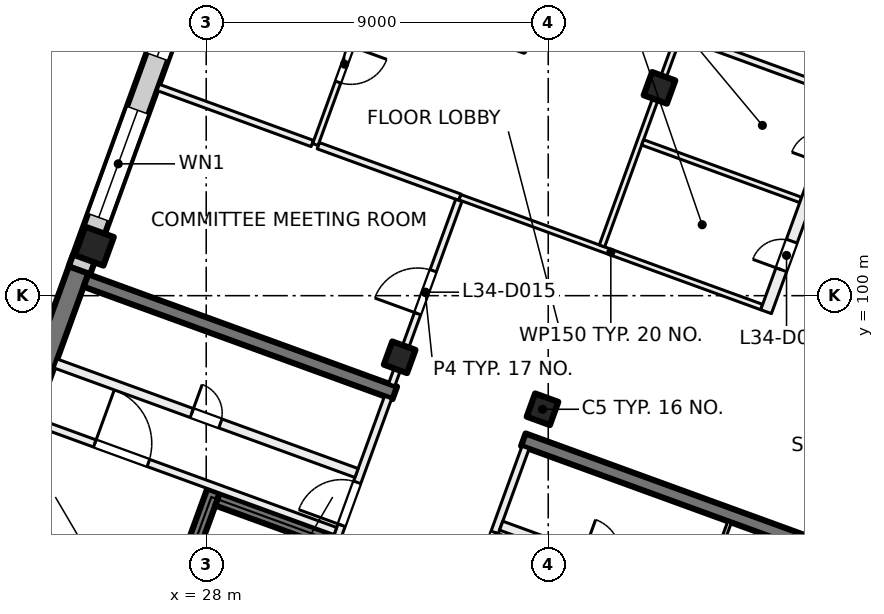
"""IFC4 building model, lengths in metres.
Left out: names, types, materials, properties, quantities, classifications, styles, units other than length and angle.
Written with IfcOpenShell. Run it as: python <this file> out.ifc"""

import sys

from ifc_helpers import new_model, si_unit, direction, frame, frame_2d, origin, origin_2d, place, context, subcontext, project, spatial, rectangle, extrude, element, fill, save


model = new_model("IFC4")
c1 = context("Model", 3, precision=1e-05, world=origin(), true_north=direction((0.0, 1.0)))
c2 = subcontext(c1, "Body", "Model", "MODEL_VIEW")
j1 = project(units=[si_unit("LENGTHUNIT", "METRE"), si_unit("PLANEANGLEUNIT", "RADIAN")], contexts=[c1])
p1 = place(None, origin())
s1 = spatial("IfcSite", under=j1, at=p1, CompositionType="ELEMENT")
p2 = place(p1, origin())
s2 = spatial("IfcBuilding", under=s1, at=p2, CompositionType="ELEMENT")
p3 = place(p2, frame((0.0, 0.0, 146.5)))
s3 = spatial("IfcBuildingStorey", under=s2, at=p3, CompositionType="ELEMENT", Elevation=146.5)
for number, where, z_axis, x_axis in (
    (1, (39.927, 105.468, 0.0), (0.0, 0.0, 1.0), (-0.342, -0.94, 0.0)),
    (2, (36.849, 97.011, 0.0), (0.0, 0.0, 1.0), (-0.342, -0.94, 0.0)),
    (3, (33.091, 98.379, 0.0), (0.0, 0.0, 1.0), (-0.342, -0.94, 0.0)),
):
    element("IfcColumn", number, at=place(p3, frame(where, z_axis=z_axis, x_axis=x_axis)), inside=s3, PredefinedType="COLUMN", context=c2, shape_type="SweptSolid", body=[
        extrude(rectangle(XDim=0.65, YDim=0.65, at=origin_2d()), origin(), (0.0, 0.0, 1.0), 4.0),
    ])
p4 = place(p3, frame((25.056, 101.303, 0.0), z_axis=(0.0, 0.0, 1.0), x_axis=(-0.342020143326, -0.939692620786, 0.0)))
e4 = element("IfcColumn", 4, at=p4, inside=s3, PredefinedType="COLUMN", context=c2, shape_type="SweptSolid", body=[
    extrude(rectangle(XDim=0.8, YDim=0.8, at=origin_2d()), origin(), (0.0, 0.0, 1.0), 4.0),
])
p5 = place(p3, frame((41.85, 85.241, 0.0), z_axis=(0.0, 0.0, 1.0), x_axis=(0.34201902012, 0.939693029598, 0.0)))
e5 = element("IfcWall", 5, at=p5, inside=s3, PredefinedType="SHEAR", context=c2, shape_type="SweptSolid", body=[
    extrude(rectangle(XDim=8.95, YDim=0.55, at=frame_2d((4.475, 0.0))), origin(), (0.0, 0.0, 1.0), 4.0),
])
p6 = place(p3, frame((21.694, 92.577, 0.0), z_axis=(0.0, 0.0, 1.0), x_axis=(0.342010253184, 0.939696220444, 0.0)))
e6 = element("IfcWall", 6, at=p6, inside=s3, PredefinedType="SHEAR", context=c2, shape_type="SweptSolid", body=[
    extrude(rectangle(XDim=8.95, YDim=0.55, at=frame_2d((4.475, 0.0))), origin(), (0.0, 0.0, 1.0), 4.0),
])
p7 = place(p3, frame((27.208, 82.216, 0.0), z_axis=(0.0, 0.0, 1.0), x_axis=(0.34201563943, 0.939694260058, 0.0)))
e7 = element("IfcWall", 7, at=p7, inside=s3, PredefinedType="SHEAR", context=c2, shape_type="SweptSolid", body=[
    extrude(rectangle(XDim=12.225, YDim=0.35, at=frame_2d((6.113, 0.0))), origin(), (0.0, 0.0, 1.0), 4.0),
])
p8 = place(p7, frame((0.7, 0.0, 0.0)))
e8 = element("IfcOpeningElement", 8, at=p8, cuts=e7, PredefinedType="OPENING", context=c2, shape_type="SweptSolid", body=[
    extrude(rectangle(XDim=1.1, YDim=2.1, at=frame_2d((0.55, 1.05))), frame((0.0, 0.185, 0.0), z_axis=(0.0, -1.0, 0.0), x_axis=(1.0, 0.0, 0.0)), (0.0, 0.0, 1.0), 0.37),
])
p9 = place(p7, frame((3.1, 0.0, 0.0)))
e9 = element("IfcOpeningElement", 9, at=p9, cuts=e7, PredefinedType="OPENING", context=c2, shape_type="SweptSolid", body=[
    extrude(rectangle(XDim=1.1, YDim=2.1, at=frame_2d((0.55, 1.05))), frame((0.0, 0.185, 0.0), z_axis=(0.0, -1.0, 0.0), x_axis=(1.0, 0.0, 0.0)), (0.0, 0.0, 1.0), 0.37),
])
p10 = place(p7, frame((5.5, 0.0, 0.0)))
e10 = element("IfcOpeningElement", 10, at=p10, cuts=e7, PredefinedType="OPENING", context=c2, shape_type="SweptSolid", body=[
    extrude(rectangle(XDim=1.1, YDim=2.1, at=frame_2d((0.55, 1.05))), frame((0.0, 0.185, 0.0), z_axis=(0.0, -1.0, 0.0), x_axis=(1.0, 0.0, 0.0)), (0.0, 0.0, 1.0), 0.37),
])
p11 = place(p7, frame((10.3, 0.0, 0.0)))
e11 = element("IfcOpeningElement", 11, at=p11, cuts=e7, PredefinedType="OPENING", context=c2, shape_type="SweptSolid", body=[
    extrude(rectangle(XDim=1.1, YDim=2.1, at=frame_2d((0.55, 1.05))), frame((0.0, 0.185, 0.0), z_axis=(0.0, -1.0, 0.0), x_axis=(1.0, 0.0, 0.0)), (0.0, 0.0, 1.0), 0.37),
])
p12 = place(p3, frame((24.013, 83.379, 0.0), z_axis=(0.0, 0.0, 1.0), x_axis=(0.34201563943, 0.939694260058, 0.0)))
e12 = element("IfcWall", 12, at=p12, inside=s3, PredefinedType="SHEAR", context=c2, shape_type="SweptSolid", body=[
    extrude(rectangle(XDim=12.225, YDim=0.35, at=frame_2d((6.113, 0.0))), origin(), (0.0, 0.0, 1.0), 4.0),
])
p13 = place(p12, frame((7.95, 0.0, 0.0)))
e13 = element("IfcOpeningElement", 13, at=p13, cuts=e12, PredefinedType="OPENING", context=c2, shape_type="SweptSolid", body=[
    extrude(rectangle(XDim=1.1, YDim=2.1, at=frame_2d((0.55, 1.05))), frame((0.0, 0.185, 0.0), z_axis=(0.0, -1.0, 0.0), x_axis=(1.0, 0.0, 0.0)), (0.0, 0.0, 1.0), 0.37),
])
p14 = place(p3, frame((31.165, 93.599, 0.0), z_axis=(0.0, 0.0, 1.0), x_axis=(-0.939683528043, 0.3420451244, 0.0)))
e14 = element("IfcWall", 14, at=p14, inside=s3, PredefinedType="SHEAR", context=c2, shape_type="SweptSolid", body=[
    extrude(rectangle(XDim=3.05, YDim=0.35, at=frame_2d((1.525, 0.0))), origin(), (0.0, 0.0, 1.0), 4.0),
])
p15 = place(p3, frame((44.473, 93.251, 0.0), z_axis=(0.0, 0.0, 1.0), x_axis=(-0.939692847377, 0.34201952077, 0.0)))
e15 = element("IfcWall", 15, at=p15, inside=s3, PredefinedType="SHEAR", context=c2, shape_type="SweptSolid", body=[
    extrude(rectangle(XDim=8.65, YDim=0.35, at=frame_2d((4.325, 0.0))), origin(), (0.0, 0.0, 1.0), 4.0),
])
p16 = place(p3, frame((32.962, 97.441, 0.0), z_axis=(0.0, 0.0, 1.0), x_axis=(-0.939689545667, 0.342028592028, 0.0)))
e16 = element("IfcWall", 16, at=p16, inside=s3, PredefinedType="SHEAR", context=c2, shape_type="SweptSolid", body=[
    extrude(rectangle(XDim=8.65, YDim=0.35, at=frame_2d((4.325, 0.0))), origin(), (0.0, 0.0, 1.0), 4.0),
])
p17 = place(p3, frame((24.666, 100.669, 0.0), z_axis=(0.0, 0.0, 1.0), x_axis=(0.34201964167, 0.939692803373, 0.0)))
e17 = element("IfcWall", 17, at=p17, inside=s3, PredefinedType="SOLIDWALL", context=c2, shape_type="SweptSolid", body=[
    extrude(rectangle(XDim=32.884, YDim=0.6, at=frame_2d((16.442, 0.0))), origin(), (0.0, 0.0, 1.0), 3.625),
])
p18 = place(p17, frame((1.48, 0.0, 0.9)))
e18 = element("IfcOpeningElement", 18, at=p18, cuts=e17, PredefinedType="OPENING", context=c2, shape_type="SweptSolid", body=[
    extrude(rectangle(XDim=3.0, YDim=2.4, at=frame_2d((1.5, 1.2))), frame((0.0, 0.31, 0.0), z_axis=(0.0, -1.0, 0.0), x_axis=(1.0, 0.0, 0.0)), (0.0, 0.0, 1.0), 0.62),
])
p19 = place(p17, frame((5.98, 0.0, 0.9)))
e19 = element("IfcOpeningElement", 19, at=p19, cuts=e17, PredefinedType="OPENING", context=c2, shape_type="SweptSolid", body=[
    extrude(rectangle(XDim=3.0, YDim=2.4, at=frame_2d((1.5, 1.2))), frame((0.0, 0.31, 0.0), z_axis=(0.0, -1.0, 0.0), x_axis=(1.0, 0.0, 0.0)), (0.0, 0.0, 1.0), 0.62),
])
p20 = place(p17, frame((10.48, 0.0, 0.9)))
e20 = element("IfcOpeningElement", 20, at=p20, cuts=e17, PredefinedType="OPENING", context=c2, shape_type="SweptSolid", body=[
    extrude(rectangle(XDim=3.0, YDim=2.4, at=frame_2d((1.5, 1.2))), frame((0.0, 0.31, 0.0), z_axis=(0.0, -1.0, 0.0), x_axis=(1.0, 0.0, 0.0)), (0.0, 0.0, 1.0), 0.62),
])
p21 = place(p17, frame((14.98, 0.0, 0.9)))
e21 = element("IfcOpeningElement", 21, at=p21, cuts=e17, PredefinedType="OPENING", context=c2, shape_type="SweptSolid", body=[
    extrude(rectangle(XDim=3.0, YDim=2.4, at=frame_2d((1.5, 1.2))), frame((0.0, 0.31, 0.0), z_axis=(0.0, -1.0, 0.0), x_axis=(1.0, 0.0, 0.0)), (0.0, 0.0, 1.0), 0.62),
])
p22 = place(p17, frame((19.48, 0.0, 0.9)))
e22 = element("IfcOpeningElement", 22, at=p22, cuts=e17, PredefinedType="OPENING", context=c2, shape_type="SweptSolid", body=[
    extrude(rectangle(XDim=3.0, YDim=2.4, at=frame_2d((1.5, 1.2))), frame((0.0, 0.31, 0.0), z_axis=(0.0, -1.0, 0.0), x_axis=(1.0, 0.0, 0.0)), (0.0, 0.0, 1.0), 0.62),
])
p23 = place(p17, frame((23.98, 0.0, 0.9)))
e23 = element("IfcOpeningElement", 23, at=p23, cuts=e17, PredefinedType="OPENING", context=c2, shape_type="SweptSolid", body=[
    extrude(rectangle(XDim=3.0, YDim=2.4, at=frame_2d((1.5, 1.2))), frame((0.0, 0.31, 0.0), z_axis=(0.0, -1.0, 0.0), x_axis=(1.0, 0.0, 0.0)), (0.0, 0.0, 1.0), 0.62),
])
p24 = place(p17, frame((28.48, 0.0, 0.9)))
e24 = element("IfcOpeningElement", 24, at=p24, cuts=e17, PredefinedType="OPENING", context=c2, shape_type="SweptSolid", body=[
    extrude(rectangle(XDim=3.0, YDim=2.4, at=frame_2d((1.5, 1.2))), frame((0.0, 0.31, 0.0), z_axis=(0.0, -1.0, 0.0), x_axis=(1.0, 0.0, 0.0)), (0.0, 0.0, 1.0), 0.62),
])
p25 = place(p3, frame((31.459, 93.678, 0.0), z_axis=(0.0, 0.0, 1.0), x_axis=(0.341985870128, 0.939705094502, 0.0)))
e25 = element("IfcWall", 25, at=p25, inside=s3, PredefinedType="PARTITIONING", context=c2, shape_type="SweptSolid", body=[
    extrude(rectangle(XDim=3.875, YDim=0.2, at=frame_2d((1.938, 0.0))), origin(), (0.0, 0.0, 1.0), 3.625),
])
p26 = place(p25, frame((0.3, 0.0, 0.0)))
e26 = element("IfcOpeningElement", 26, at=p26, cuts=e25, PredefinedType="OPENING", context=c2, shape_type="SweptSolid", body=[
    extrude(rectangle(XDim=1.2, YDim=2.1, at=frame_2d((0.6, 1.05))), frame((0.0, 0.11, 0.0), z_axis=(0.0, -1.0, 0.0), x_axis=(1.0, 0.0, 0.0)), (0.0, 0.0, 1.0), 0.22),
])
p27 = place(p3, frame((23.483, 96.688, 0.0), z_axis=(0.0, 0.0, 1.0), x_axis=(0.939691007314, -0.342024576271, 0.0)))
e27 = element("IfcWall", 27, at=p27, inside=s3, PredefinedType="PARTITIONING", context=c2, shape_type="SweptSolid", body=[
    extrude(rectangle(XDim=8.425, YDim=0.2, at=frame_2d((4.212, 0.0))), origin(), (0.0, 0.0, 1.0), 3.625),
])
p28 = place(p27, frame((1.688, 0.0, 0.0)))
e28 = element("IfcOpeningElement", 28, at=p28, cuts=e27, PredefinedType="OPENING", context=c2, shape_type="SweptSolid", body=[
    extrude(rectangle(XDim=1.5, YDim=2.1, at=frame_2d((0.75, 1.05))), frame((0.0, 0.11, 0.0), z_axis=(0.0, -1.0, 0.0), x_axis=(1.0, 0.0, 0.0)), (0.0, 0.0, 1.0), 0.22),
])
p29 = place(p3, frame((24.039, 98.215, 0.0), z_axis=(0.0, 0.0, 1.0), x_axis=(0.939687617333, -0.342033889887, 0.0)))
e29 = element("IfcWall", 29, at=p29, inside=s3, PredefinedType="PARTITIONING", context=c2, shape_type="SweptSolid", body=[
    extrude(rectangle(XDim=8.425, YDim=0.25, at=frame_2d((4.212, 0.0))), origin(), (0.0, 0.0, 1.0), 3.625),
])
p30 = place(p29, frame((3.812, 0.0, 0.0)))
e30 = element("IfcOpeningElement", 30, at=p30, cuts=e29, PredefinedType="OPENING", context=c2, shape_type="SweptSolid", body=[
    extrude(rectangle(XDim=0.8, YDim=2.1, at=frame_2d((0.4, 1.05))), frame((0.0, 0.135, 0.0), z_axis=(0.0, -1.0, 0.0), x_axis=(1.0, 0.0, 0.0)), (0.0, 0.0, 1.0), 0.27),
])
p31 = place(p3, frame((36.403, 96.003, 0.0), z_axis=(0.0, 0.0, 1.0), x_axis=(-0.342041503764, -0.939684845947, 0.0)))
e31 = element("IfcWall", 31, at=p31, inside=s3, PredefinedType="PARTITIONING", context=c2, shape_type="SweptSolid", body=[
    extrude(rectangle(XDim=3.875, YDim=0.2, at=frame_2d((1.938, 0.0))), origin(), (0.0, 0.0, 1.0), 3.625),
])
p32 = place(p31, frame((2.375, 0.0, 0.0)))
e32 = element("IfcOpeningElement", 32, at=p32, cuts=e31, PredefinedType="OPENING", context=c2, shape_type="SweptSolid", body=[
    extrude(rectangle(XDim=1.2, YDim=2.1, at=frame_2d((0.6, 1.05))), frame((0.0, 0.11, 0.0), z_axis=(0.0, -1.0, 0.0), x_axis=(1.0, 0.0, 0.0)), (0.0, 0.0, 1.0), 0.22),
])
p33 = place(p3, frame((35.761, 93.948, 0.0), z_axis=(0.0, 0.0, 1.0), x_axis=(0.93969693093, -0.342008301071, 0.0)))
e33 = element("IfcWall", 33, at=p33, inside=s3, PredefinedType="PARTITIONING", context=c2, shape_type="SweptSolid", body=[
    extrude(rectangle(XDim=8.425, YDim=0.25, at=frame_2d((4.212, 0.0))), origin(), (0.0, 0.0, 1.0), 3.625),
])
p34 = place(p33, frame((2.282, 0.0, 0.0)))
e34 = element("IfcOpeningElement", 34, at=p34, cuts=e33, PredefinedType="OPENING", context=c2, shape_type="SweptSolid", body=[
    extrude(rectangle(XDim=1.0, YDim=2.1, at=frame_2d((0.5, 1.05))), frame((0.0, 0.135, 0.0), z_axis=(0.0, -1.0, 0.0), x_axis=(1.0, 0.0, 0.0)), (0.0, 0.0, 1.0), 0.27),
])
p35 = place(p33, frame((6.545, 0.0, 0.0)))
e35 = element("IfcOpeningElement", 35, at=p35, cuts=e33, PredefinedType="OPENING", context=c2, shape_type="SweptSolid", body=[
    extrude(rectangle(XDim=1.0, YDim=2.1, at=frame_2d((0.5, 1.05))), frame((0.0, 0.135, 0.0), z_axis=(0.0, -1.0, 0.0), x_axis=(1.0, 0.0, 0.0)), (0.0, 0.0, 1.0), 0.27),
])
p36 = place(p3, frame((41.773, 94.048, 0.0), z_axis=(0.0, 0.0, 1.0), x_axis=(-0.342043138314, -0.939684250976, 0.0)))
e36 = element("IfcWall", 36, at=p36, inside=s3, PredefinedType="PARTITIONING", context=c2, shape_type="SweptSolid", body=[
    extrude(rectangle(XDim=2.025, YDim=0.1, at=frame_2d((1.012, 0.0))), origin(), (0.0, 0.0, 1.0), 3.625),
])
p37 = place(p3, frame((26.736, 105.48, 0.0), z_axis=(0.0, 0.0, 1.0), x_axis=(0.939677739056, -0.342061027776, 0.0)))
e37 = element("IfcWall", 37, at=p37, inside=s3, PredefinedType="PARTITIONING", context=c2, shape_type="SweptSolid", body=[
    extrude(rectangle(XDim=4.315, YDim=0.175, at=frame_2d((2.158, 0.0))), origin(), (0.0, 0.0, 1.0), 3.625),
])
p38 = place(p3, frame((30.95, 103.946, 0.0), z_axis=(0.0, 0.0, 1.0), x_axis=(0.939739492658, -0.341891336449, 0.0)))
e38 = element("IfcWall", 38, at=p38, inside=s3, PredefinedType="PARTITIONING", context=c2, shape_type="SweptSolid", body=[
    extrude(rectangle(XDim=3.966, YDim=0.175, at=frame_2d((1.983, 0.0))), origin(), (0.0, 0.0, 1.0), 3.625),
])
p39 = place(p3, frame((32.436, 108.274, 0.0), z_axis=(0.0, 0.0, 1.0), x_axis=(-0.342145890874, -0.939646842893, 0.0)))
e39 = element("IfcWall", 39, at=p39, inside=s3, PredefinedType="PARTITIONING", context=c2, shape_type="SweptSolid", body=[
    extrude(rectangle(XDim=4.574, YDim=0.15, at=frame_2d((2.287, 0.0))), origin(), (0.0, 0.0, 1.0), 3.625),
])
p40 = place(p39, frame((1.824, 0.0, 0.0)))
e40 = element("IfcOpeningElement", 40, at=p40, cuts=e39, PredefinedType="OPENING", context=c2, shape_type="SweptSolid", body=[
    extrude(rectangle(XDim=1.0, YDim=2.1, at=frame_2d((0.5, 1.05))), frame((0.0, 0.085, 0.0), z_axis=(0.0, -1.0, 0.0), x_axis=(1.0, 0.0, 0.0)), (0.0, 0.0, 1.0), 0.17),
])
p41 = place(p3, frame((32.881, 97.657, 0.0), z_axis=(0.0, 0.0, 1.0), x_axis=(0.342058204353, 0.939678766832, 0.0)))
e41 = element("IfcWall", 41, at=p41, inside=s3, PredefinedType="PARTITIONING", context=c2, shape_type="SweptSolid", body=[
    extrude(rectangle(XDim=5.163, YDim=0.175, at=frame_2d((2.581, 0.0))), origin(), (0.0, 0.0, 1.0), 3.625),
])
p42 = place(p41, frame((1.991, 0.0, 0.0)))
e42 = element("IfcOpeningElement", 42, at=p42, cuts=e41, PredefinedType="OPENING", context=c2, shape_type="SweptSolid", body=[
    extrude(rectangle(XDim=1.2, YDim=2.1, at=frame_2d((0.6, 1.05))), frame((0.0, 0.097, 0.0), z_axis=(0.0, -1.0, 0.0), x_axis=(1.0, 0.0, 0.0)), (0.0, 0.0, 1.0), 0.195),
])
p43 = place(p3, frame((34.677, 102.59, 0.0), z_axis=(0.0, 0.0, 1.0), x_axis=(0.939683705252, -0.342044637561, 0.0)))
e43 = element("IfcWall", 43, at=p43, inside=s3, PredefinedType="PARTITIONING", context=c2, shape_type="SweptSolid", body=[
    extrude(rectangle(XDim=8.45, YDim=0.15, at=frame_2d((4.225, 0.0))), origin(), (0.0, 0.0, 1.0), 3.625),
])
p44 = place(p3, frame((38.414, 101.309, 0.0), z_axis=(0.0, 0.0, 1.0), x_axis=(0.34186876189, 0.939747705315, 0.0)))
e44 = element("IfcWall", 44, at=p44, inside=s3, PredefinedType="PARTITIONING", context=c2, shape_type="SweptSolid", body=[
    extrude(rectangle(XDim=5.926, YDim=0.15, at=frame_2d((2.963, 0.0))), origin(), (0.0, 0.0, 1.0), 3.625),
])
p45 = place(p3, frame((39.484, 104.033, 0.0), z_axis=(0.0, 0.0, 1.0), x_axis=(0.939685474739, -0.342039776289, 0.0)))
e45 = element("IfcWall", 45, at=p45, inside=s3, PredefinedType="PARTITIONING", context=c2, shape_type="SweptSolid", body=[
    extrude(rectangle(XDim=4.426, YDim=0.15, at=frame_2d((2.213, 0.0))), origin(), (0.0, 0.0, 1.0), 3.625),
])
p46 = place(p3, frame((40.522, 106.848, 0.0), z_axis=(0.0, 0.0, 1.0), x_axis=(0.939646357962, -0.342147222654, 0.0)))
e46 = element("IfcWall", 46, at=p46, inside=s3, PredefinedType="PARTITIONING", context=c2, shape_type="SweptSolid", body=[
    extrude(rectangle(XDim=4.413, YDim=0.175, at=frame_2d((2.207, 0.0))), origin(), (0.0, 0.0, 1.0), 3.625),
])
p47 = place(p3, frame((42.732, 99.579, 0.0), z_axis=(0.0, 0.0, 1.0), x_axis=(0.342036000593, 0.939686849061, 0.0)))
e47 = element("IfcWall", 47, at=p47, inside=s3, PredefinedType="PARTITIONING", context=c2, shape_type="SweptSolid", body=[
    extrude(rectangle(XDim=23.018, YDim=0.3, at=frame_2d((11.509, 0.0))), origin(), (0.0, 0.0, 1.0), 3.625),
])
p48 = place(p47, frame((1.175, 0.0, 0.0)))
e48 = element("IfcOpeningElement", 48, at=p48, cuts=e47, PredefinedType="OPENING", context=c2, shape_type="SweptSolid", body=[
    extrude(rectangle(XDim=0.8, YDim=2.1, at=frame_2d((0.4, 1.05))), frame((0.0, 0.16, 0.0), z_axis=(0.0, -1.0, 0.0), x_axis=(1.0, 0.0, 0.0)), (0.0, 0.0, 1.0), 0.32),
])
p49 = place(p47, frame((4.175, 0.0, 0.0)))
e49 = element("IfcOpeningElement", 49, at=p49, cuts=e47, PredefinedType="OPENING", context=c2, shape_type="SweptSolid", body=[
    extrude(rectangle(XDim=0.8, YDim=2.1, at=frame_2d((0.4, 1.05))), frame((0.0, 0.16, 0.0), z_axis=(0.0, -1.0, 0.0), x_axis=(1.0, 0.0, 0.0)), (0.0, 0.0, 1.0), 0.32),
])
p50 = place(p47, frame((7.725, 0.0, 0.0)))
e50 = element("IfcOpeningElement", 50, at=p50, cuts=e47, PredefinedType="OPENING", context=c2, shape_type="SweptSolid", body=[
    extrude(rectangle(XDim=1.2, YDim=2.1, at=frame_2d((0.6, 1.05))), frame((0.0, 0.16, 0.0), z_axis=(0.0, -1.0, 0.0), x_axis=(1.0, 0.0, 0.0)), (0.0, 0.0, 1.0), 0.32),
])
p51 = place(p47, frame((15.675, 0.0, 0.0)))
e51 = element("IfcOpeningElement", 51, at=p51, cuts=e47, PredefinedType="OPENING", context=c2, shape_type="SweptSolid", body=[
    extrude(rectangle(XDim=1.8, YDim=2.1, at=frame_2d((0.9, 1.05))), frame((0.0, 0.16, 0.0), z_axis=(0.0, -1.0, 0.0), x_axis=(1.0, 0.0, 0.0)), (0.0, 0.0, 1.0), 0.32),
])
p52 = place(p18, origin())
e52 = element("IfcWindow", 52, at=p52, inside=s3, PartitioningType="SINGLE_PANEL", PredefinedType="WINDOW", context=c2, shape_type="SweptSolid", body=[
    extrude(rectangle(XDim=3.0, YDim=2.4, at=frame_2d((1.5, 1.2))), frame((0.0, 0.03, 0.0), z_axis=(0.0, -1.0, 0.0), x_axis=(1.0, 0.0, 0.0)), (0.0, 0.0, 1.0), 0.06),
])
fill(e18, e52)
p53 = place(p19, origin())
e53 = element("IfcWindow", 53, at=p53, inside=s3, PartitioningType="SINGLE_PANEL", PredefinedType="WINDOW", context=c2, shape_type="SweptSolid", body=[
    extrude(rectangle(XDim=3.0, YDim=2.4, at=frame_2d((1.5, 1.2))), frame((0.0, 0.03, 0.0), z_axis=(0.0, -1.0, 0.0), x_axis=(1.0, 0.0, 0.0)), (0.0, 0.0, 1.0), 0.06),
])
fill(e19, e53)
p54 = place(p26, origin())
e54 = element("IfcDoor", 54, at=p54, inside=s3, OperationType="DOUBLE_DOOR_SINGLE_SWING", PredefinedType="DOOR", context=c2, shape_type="SweptSolid", body=[
    extrude(rectangle(XDim=1.2, YDim=2.1, at=frame_2d((0.6, 1.05))), frame((0.0, 0.025, 0.0), z_axis=(0.0, -1.0, 0.0), x_axis=(1.0, 0.0, 0.0)), (0.0, 0.0, 1.0), 0.05),
])
fill(e26, e54)
p55 = place(p28, origin())
e55 = element("IfcDoor", 55, at=p55, inside=s3, OperationType="DOUBLE_DOOR_SINGLE_SWING", PredefinedType="DOOR", context=c2, shape_type="SweptSolid", body=[
    extrude(rectangle(XDim=1.5, YDim=2.1, at=frame_2d((0.75, 1.05))), frame((0.0, 0.025, 0.0), z_axis=(0.0, -1.0, 0.0), x_axis=(1.0, 0.0, 0.0)), (0.0, 0.0, 1.0), 0.05),
])
fill(e28, e55)
p56 = place(p30, origin())
e56 = element("IfcDoor", 56, at=p56, inside=s3, OperationType="SINGLE_SWING_LEFT", PredefinedType="DOOR", context=c2, shape_type="SweptSolid", body=[
    extrude(rectangle(XDim=0.8, YDim=2.1, at=frame_2d((0.4, 1.05))), frame((0.0, 0.025, 0.0), z_axis=(0.0, -1.0, 0.0), x_axis=(1.0, 0.0, 0.0)), (0.0, 0.0, 1.0), 0.05),
])
fill(e30, e56)
p57 = place(p32, origin())
e57 = element("IfcDoor", 57, at=p57, inside=s3, OperationType="DOUBLE_DOOR_SINGLE_SWING", PredefinedType="DOOR", context=c2, shape_type="SweptSolid", body=[
    extrude(rectangle(XDim=1.2, YDim=2.1, at=frame_2d((0.6, 1.05))), frame((0.0, 0.025, 0.0), z_axis=(0.0, -1.0, 0.0), x_axis=(1.0, 0.0, 0.0)), (0.0, 0.0, 1.0), 0.05),
])
fill(e32, e57)
p58 = place(p42, origin())
e58 = element("IfcDoor", 58, at=p58, inside=s3, OperationType="DOUBLE_DOOR_SINGLE_SWING", PredefinedType="DOOR", context=c2, shape_type="SweptSolid", body=[
    extrude(rectangle(XDim=1.2, YDim=2.1, at=frame_2d((0.6, 1.05))), frame((0.0, 0.025, 0.0), z_axis=(0.0, -1.0, 0.0), x_axis=(1.0, 0.0, 0.0)), (0.0, 0.0, 1.0), 0.05),
])
fill(e42, e58)
p59 = place(p48, origin())
e59 = element("IfcDoor", 59, at=p59, inside=s3, OperationType="SINGLE_SWING_RIGHT", PredefinedType="DOOR", context=c2, shape_type="SweptSolid", body=[
    extrude(rectangle(XDim=0.8, YDim=2.1, at=frame_2d((0.4, 1.05))), frame((0.0, 0.025, 0.0), z_axis=(0.0, -1.0, 0.0), x_axis=(1.0, 0.0, 0.0)), (0.0, 0.0, 1.0), 0.05),
])
fill(e48, e59)
p60 = place(p40, origin())
e60 = element("IfcDoor", 60, at=p60, inside=s3, OperationType="SINGLE_SWING_LEFT", PredefinedType="DOOR", context=c2, shape_type="SweptSolid", body=[
    extrude(rectangle(XDim=1.0, YDim=2.1, at=frame_2d((0.5, 1.05))), frame((0.0, 0.025, 0.0), z_axis=(0.0, -1.0, 0.0), x_axis=(1.0, 0.0, 0.0)), (0.0, 0.0, 1.0), 0.05),
])
fill(e40, e60)
save(model, sys.argv[1])
